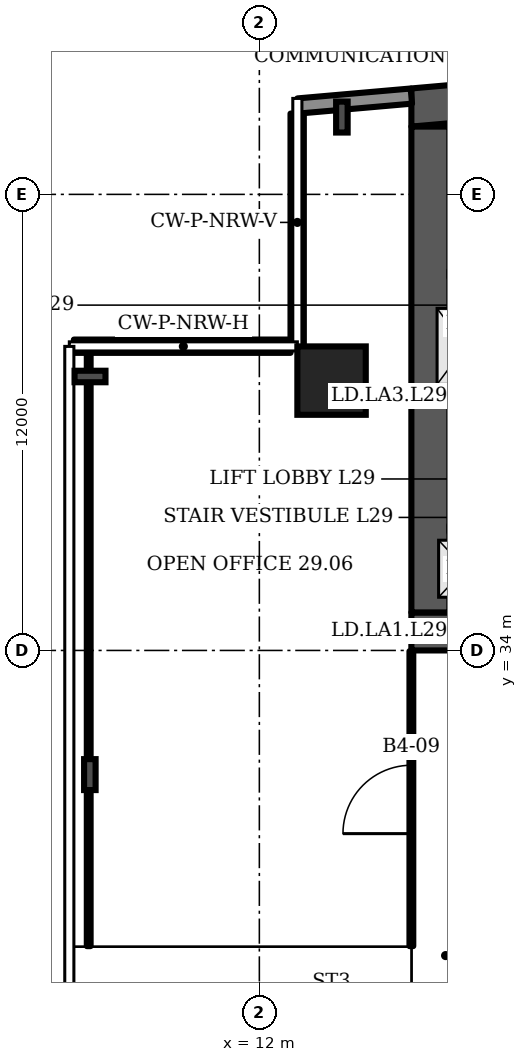
"""IFC4 building model, lengths in metres.
Left out: names, types, materials, properties, quantities, classifications, styles, units other than length and angle.
Written with IfcOpenShell. Run it as: python <this file> out.ifc"""

import sys

from ifc_helpers import new_model, si_unit, direction, frame, frame_2d, origin, origin_2d, place, context, subcontext, project, spatial, polyline, rectangle, i_section, outline, extrude, element, fill, save


model = new_model("IFC4")
c1 = context("Model", 3, precision=1e-05, world=origin(), true_north=direction((0.0, 1.0)))
c2 = subcontext(c1, "Body", "Model", "MODEL_VIEW")
j1 = project(units=[si_unit("LENGTHUNIT", "METRE"), si_unit("PLANEANGLEUNIT", "RADIAN")], contexts=[c1])
p1 = place(None, origin())
s1 = spatial("IfcSite", under=j1, at=p1, CompositionType="ELEMENT")
p2 = place(p1, origin())
s2 = spatial("IfcBuilding", under=s1, at=p2, CompositionType="ELEMENT")
p3 = place(p2, frame((0.0, 0.0, 125.5)))
s3 = spatial("IfcBuildingStorey", under=s2, at=p3, CompositionType="ELEMENT", Elevation=125.5)
p4 = place(p3, origin())
e1 = element("IfcWall", 1, at=p4, inside=s3, PredefinedType="SHEAR", context=c2, shape_type="SweptSolid", body=[
    extrude(outline(polyline([(16.0, 47.784), (40.5, 49.927), (65.0, 47.784), (65.0, 48.787), (40.5, 50.931), (16.0, 48.787), (16.0, 47.784)])), origin(), (0.0, 0.0, 1.0), 3.6),
])
p5 = place(p3, frame((16.0, 34.5, 0.0), z_axis=(0.0, 0.0, 1.0), x_axis=(1.0, 0.0, 0.0)))
e2 = element("IfcWall", 2, at=p5, inside=s3, PredefinedType="SHEAR", context=c2, shape_type="SweptSolid", body=[
    extrude(rectangle(XDim=49.0, YDim=1.0, at=frame_2d((24.5, 0.0))), origin(), (0.0, 0.0, 1.0), 3.6),
])
p6 = place(p5, frame((1.2, 0.0, 0.0)))
e3 = element("IfcOpeningElement", 3, at=p6, cuts=e2, PredefinedType="OPENING", context=c2, shape_type="SweptSolid", body=[
    extrude(rectangle(XDim=1.1, YDim=2.1, at=frame_2d((0.55, 1.05))), frame((0.0, 0.51, 0.0), z_axis=(0.0, -1.0, 0.0), x_axis=(1.0, 0.0, 0.0)), (0.0, 0.0, 1.0), 1.02),
])
p7 = place(p5, frame((5.083, 0.0, 0.0)))
e4 = element("IfcOpeningElement", 4, at=p7, cuts=e2, PredefinedType="OPENING", context=c2, shape_type="SweptSolid", body=[
    extrude(rectangle(XDim=1.1, YDim=2.1, at=frame_2d((0.55, 1.05))), frame((0.0, 0.51, 0.0), z_axis=(0.0, -1.0, 0.0), x_axis=(1.0, 0.0, 0.0)), (0.0, 0.0, 1.0), 1.02),
])
p8 = place(p5, frame((2.933, 0.0, 0.0)))
e5 = element("IfcOpeningElement", 5, at=p8, cuts=e2, PredefinedType="OPENING", context=c2, shape_type="SweptSolid", body=[
    extrude(rectangle(XDim=1.4, YDim=2.1, at=frame_2d((0.7, 1.05))), frame((0.0, 0.51, 0.0), z_axis=(0.0, -1.0, 0.0), x_axis=(1.0, 0.0, 0.0)), (0.0, 0.0, 1.0), 1.02),
])
p9 = place(p5, frame((7.65, 0.0, 0.0)))
e6 = element("IfcOpeningElement", 6, at=p9, cuts=e2, PredefinedType="OPENING", context=c2, shape_type="SweptSolid", body=[
    extrude(rectangle(XDim=1.2, YDim=2.1, at=frame_2d((0.6, 1.05))), frame((0.0, 0.51, 0.0), z_axis=(0.0, -1.0, 0.0), x_axis=(1.0, 0.0, 0.0)), (0.0, 0.0, 1.0), 1.02),
])
p10 = place(p5, frame((14.817, 0.0, 0.0)))
e7 = element("IfcOpeningElement", 7, at=p10, cuts=e2, PredefinedType="OPENING", context=c2, shape_type="SweptSolid", body=[
    extrude(rectangle(XDim=1.1, YDim=2.1, at=frame_2d((0.55, 1.05))), frame((0.0, 0.51, 0.0), z_axis=(0.0, -1.0, 0.0), x_axis=(1.0, 0.0, 0.0)), (0.0, 0.0, 1.0), 1.02),
])
p11 = place(p5, frame((19.083, 0.0, 0.0)))
e8 = element("IfcOpeningElement", 8, at=p11, cuts=e2, PredefinedType="OPENING", context=c2, shape_type="SweptSolid", body=[
    extrude(rectangle(XDim=1.1, YDim=2.1, at=frame_2d((0.55, 1.05))), frame((0.0, 0.51, 0.0), z_axis=(0.0, -1.0, 0.0), x_axis=(1.0, 0.0, 0.0)), (0.0, 0.0, 1.0), 1.02),
])
p12 = place(p5, frame((16.8, 0.0, 0.0)))
e9 = element("IfcOpeningElement", 9, at=p12, cuts=e2, PredefinedType="OPENING", context=c2, shape_type="SweptSolid", body=[
    extrude(rectangle(XDim=1.4, YDim=2.1, at=frame_2d((0.7, 1.05))), frame((0.0, 0.51, 0.0), z_axis=(0.0, -1.0, 0.0), x_axis=(1.0, 0.0, 0.0)), (0.0, 0.0, 1.0), 1.02),
])
p13 = place(p5, frame((21.817, 0.0, 0.0)))
e10 = element("IfcOpeningElement", 10, at=p13, cuts=e2, PredefinedType="OPENING", context=c2, shape_type="SweptSolid", body=[
    extrude(rectangle(XDim=1.1, YDim=2.1, at=frame_2d((0.55, 1.05))), frame((0.0, 0.51, 0.0), z_axis=(0.0, -1.0, 0.0), x_axis=(1.0, 0.0, 0.0)), (0.0, 0.0, 1.0), 1.02),
])
p14 = place(p5, frame((26.083, 0.0, 0.0)))
e11 = element("IfcOpeningElement", 11, at=p14, cuts=e2, PredefinedType="OPENING", context=c2, shape_type="SweptSolid", body=[
    extrude(rectangle(XDim=1.1, YDim=2.1, at=frame_2d((0.55, 1.05))), frame((0.0, 0.51, 0.0), z_axis=(0.0, -1.0, 0.0), x_axis=(1.0, 0.0, 0.0)), (0.0, 0.0, 1.0), 1.02),
])
p15 = place(p5, frame((33.15, 0.0, 0.0)))
e12 = element("IfcOpeningElement", 12, at=p15, cuts=e2, PredefinedType="OPENING", context=c2, shape_type="SweptSolid", body=[
    extrude(rectangle(XDim=1.2, YDim=2.1, at=frame_2d((0.6, 1.05))), frame((0.0, 0.51, 0.0), z_axis=(0.0, -1.0, 0.0), x_axis=(1.0, 0.0, 0.0)), (0.0, 0.0, 1.0), 1.02),
])
p16 = place(p5, frame((37.8, 0.0, 0.0)))
e13 = element("IfcOpeningElement", 13, at=p16, cuts=e2, PredefinedType="OPENING", context=c2, shape_type="SweptSolid", body=[
    extrude(rectangle(XDim=1.4, YDim=2.1, at=frame_2d((0.7, 1.05))), frame((0.0, 0.51, 0.0), z_axis=(0.0, -1.0, 0.0), x_axis=(1.0, 0.0, 0.0)), (0.0, 0.0, 1.0), 1.02),
])
p17 = place(p5, frame((42.817, 0.0, 0.0)))
e14 = element("IfcOpeningElement", 14, at=p17, cuts=e2, PredefinedType="OPENING", context=c2, shape_type="SweptSolid", body=[
    extrude(rectangle(XDim=1.1, YDim=2.1, at=frame_2d((0.55, 1.05))), frame((0.0, 0.51, 0.0), z_axis=(0.0, -1.0, 0.0), x_axis=(1.0, 0.0, 0.0)), (0.0, 0.0, 1.0), 1.02),
])
p18 = place(p5, frame((46.7, 0.0, 0.0)))
e15 = element("IfcOpeningElement", 15, at=p18, cuts=e2, PredefinedType="OPENING", context=c2, shape_type="SweptSolid", body=[
    extrude(rectangle(XDim=1.1, YDim=2.1, at=frame_2d((0.55, 1.05))), frame((0.0, 0.51, 0.0), z_axis=(0.0, -1.0, 0.0), x_axis=(1.0, 0.0, 0.0)), (0.0, 0.0, 1.0), 1.02),
])
p19 = place(p5, frame((44.667, 0.0, 0.0)))
e16 = element("IfcOpeningElement", 16, at=p19, cuts=e2, PredefinedType="OPENING", context=c2, shape_type="SweptSolid", body=[
    extrude(rectangle(XDim=1.4, YDim=2.1, at=frame_2d((0.7, 1.05))), frame((0.0, 0.51, 0.0), z_axis=(0.0, -1.0, 0.0), x_axis=(1.0, 0.0, 0.0)), (0.0, 0.0, 1.0), 1.02),
])
p20 = place(p3, frame((16.5, 35.0, 0.0), z_axis=(0.0, 0.0, 1.0), x_axis=(0.0, 1.0, 0.0)))
e17 = element("IfcWall", 17, at=p20, inside=s3, PredefinedType="SHEAR", context=c2, shape_type="SweptSolid", body=[
    extrude(rectangle(XDim=12.784, YDim=1.0, at=frame_2d((6.392, 0.0))), origin(), (0.0, 0.0, 1.0), 3.6),
])
p21 = place(p3, frame((13.9, 41.1, 0.0), z_axis=(0.0, 0.0, 1.0), x_axis=(1.0, 0.0, 0.0)))
e18 = element("IfcColumn", 18, at=p21, inside=s3, PredefinedType="COLUMN", context=c2, shape_type="SweptSolid", body=[
    extrude(rectangle(XDim=1.8, YDim=1.8, at=origin_2d()), origin(), (0.0, 0.0, 1.0), 3.6),
])
for number, where, z_axis, x_axis in (
    (19, (14.172, 48.034, 0.0), (0.0, 0.0, 1.0), (-1.0, 0.0, 0.0)),
    (20, (7.544, 41.208, 0.0), (0.0, 0.0, 1.0), (0.0, 1.0, 0.0)),
    (21, (7.54, 30.733, 0.0), (0.0, 0.0, 1.0), (-1.0, 0.0, 0.0)),
):
    element("IfcColumn", number, at=place(p3, frame(where, z_axis=z_axis, x_axis=x_axis)), inside=s3, PredefinedType="COLUMN", context=c2, shape_type="SweptSolid", body=[
        extrude(i_section(OverallWidth=0.303, OverallDepth=0.814, WebThickness=0.021, FlangeThickness=0.04, FilletRadius=0.03, at=origin_2d()), origin(), (0.0, 0.0, 1.0), 3.6),
    ])
p22 = place(p3, frame((16.0, 48.587, 0.0), z_axis=(0.0, 0.0, 1.0), x_axis=(-0.996194, -0.087168, 0.0)))
e22 = element("IfcWall", 22, at=p22, inside=s3, PredefinedType="SOLIDWALL", context=c2, shape_type="SweptSolid", body=[
    extrude(rectangle(XDim=2.994, YDim=0.4, at=frame_2d((1.497, 0.0))), origin(), (0.0, 0.0, 1.0), 3.2),
])
p23 = place(p3, frame((12.995, 48.126, 0.0), z_axis=(0.0, 0.0, 1.0), x_axis=(0.0, -1.0, 0.0)))
e23 = element("IfcWall", 23, at=p23, inside=s3, PredefinedType="SOLIDWALL", context=c2, shape_type="SweptSolid", body=[
    extrude(rectangle(XDim=6.126, YDim=0.35, at=frame_2d((3.063, 0.0))), origin(), (0.0, 0.0, 1.0), 1.0),
])
p24 = place(p3, frame((12.82, 42.005, 0.0), z_axis=(0.0, 0.0, 1.0), x_axis=(-1.0, 0.0, 0.0)))
e24 = element("IfcWall", 24, at=p24, inside=s3, PredefinedType="SOLIDWALL", context=c2, shape_type="SweptSolid", body=[
    extrude(rectangle(XDim=5.7, YDim=0.35, at=frame_2d((2.85, 0.0))), origin(), (0.0, 0.0, 1.0), 1.0),
])
p25 = place(p3, frame((7.51, 26.22, 0.0), z_axis=(0.0, 0.0, 1.0), x_axis=(0.0, 1.0, 0.0)))
e25 = element("IfcWall", 25, at=p25, inside=s3, PredefinedType="PARTITIONING", context=c2, shape_type="SweptSolid", body=[
    extrude(rectangle(XDim=15.76, YDim=0.1, at=frame_2d((7.88, 0.0))), origin(), (0.0, 0.0, 1.0), 2.58),
])
p26 = place(p3, frame((16.0, 26.22, 0.0), z_axis=(0.0, 0.0, 1.0), x_axis=(0.0, 1.0, 0.0)))
e26 = element("IfcWall", 26, at=p26, inside=s3, PredefinedType="PARTITIONING", context=c2, shape_type="SweptSolid", body=[
    extrude(rectangle(XDim=7.76, YDim=0.1, at=frame_2d((3.88, 0.0))), origin(), (0.0, 0.0, 1.0), 3.2),
])
p27 = place(p26, frame((2.96, 0.0, 0.0)))
e27 = element("IfcOpeningElement", 27, at=p27, cuts=e26, PredefinedType="OPENING", context=c2, shape_type="SweptSolid", body=[
    extrude(rectangle(XDim=1.8, YDim=2.1, at=frame_2d((0.9, 1.05))), frame((0.0, 0.06, 0.0), z_axis=(0.0, -1.0, 0.0), x_axis=(1.0, 0.0, 0.0)), (0.0, 0.0, 1.0), 0.12),
])
p28 = place(p27, origin())
e28 = element("IfcDoor", 28, at=p28, inside=s3, OperationType="DOUBLE_DOOR_SINGLE_SWING", PredefinedType="DOOR", context=c2, shape_type="SweptSolid", body=[
    extrude(rectangle(XDim=1.8, YDim=2.1, at=frame_2d((0.9, 1.05))), frame((0.0, 0.025, 0.0), z_axis=(0.0, -1.0, 0.0), x_axis=(1.0, 0.0, 0.0)), (0.0, 0.0, 1.0), 0.05),
])
fill(e27, e28)
save(model, sys.argv[1])
